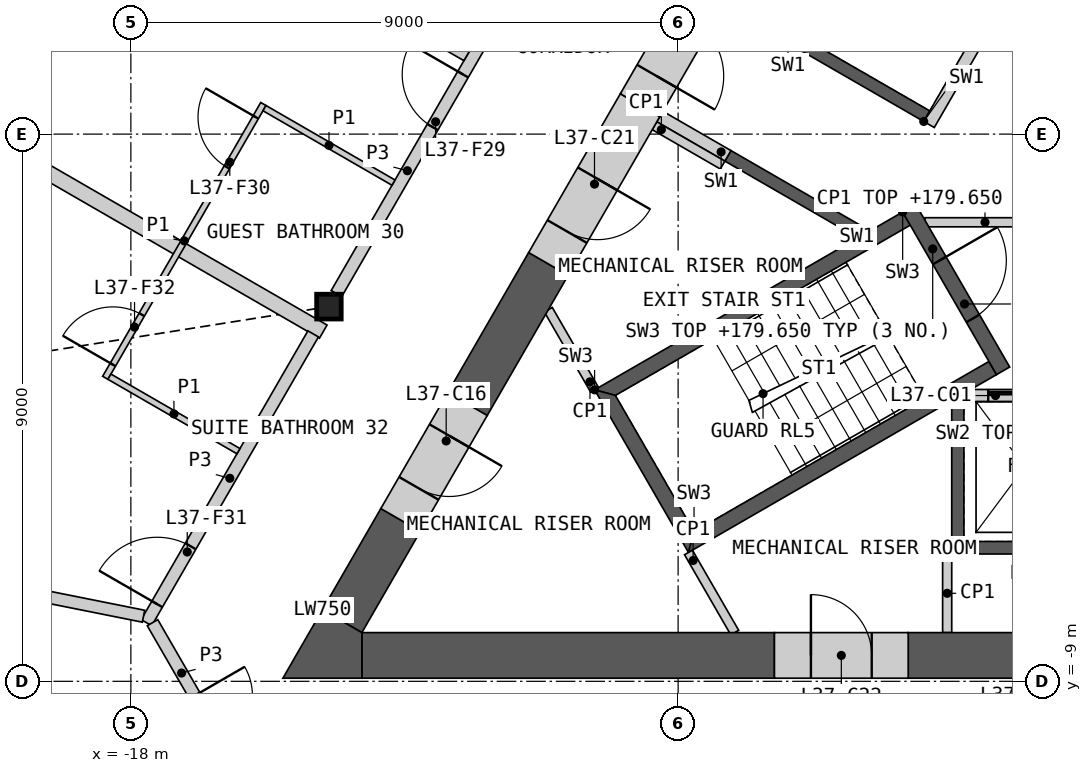
"""IFC4 building model, lengths in metres.
Left out: names, types, materials, properties, quantities, classifications, styles, units other than length and angle.
Written with IfcOpenShell. Run it as: python <this file> out.ifc"""

import sys

from ifc_helpers import new_model, si_unit, direction, frame, frame_2d, origin, origin_2d, place, context, subcontext, project, spatial, polyline, rectangle, i_section, outline, extrude, element, fill, save


model = new_model("IFC4")
c1 = context("Model", 3, precision=1e-05, world=origin(), true_north=direction((0.0, 1.0)))
c2 = subcontext(c1, "Body", "Model", "MODEL_VIEW")
j1 = project(units=[si_unit("LENGTHUNIT", "METRE"), si_unit("PLANEANGLEUNIT", "RADIAN")], contexts=[c1])
p1 = place(None, origin())
s1 = spatial("IfcSite", under=j1, at=p1, CompositionType="ELEMENT")
p2 = place(p1, origin())
s2 = spatial("IfcBuilding", under=s1, at=p2, CompositionType="ELEMENT")
p3 = place(p2, frame((0.0, 0.0, 176.4)))
s3 = spatial("IfcBuildingStorey", under=s2, at=p3, CompositionType="ELEMENT", Elevation=176.4)
p4 = place(p3, frame((-14.743, -2.837, 0.0), z_axis=(0.0, 0.0, 1.0), x_axis=(1.0, 0.0, 0.0)))
e1 = element("IfcColumn", 1, at=p4, inside=s3, PredefinedType="COLUMN", context=c2, shape_type="SweptSolid", body=[
    extrude(i_section(OverallWidth=0.404, OverallDepth=0.407, WebThickness=0.027, FlangeThickness=0.044, at=origin_2d()), origin(), (0.0, 0.0, 1.0), 3.6),
])
p5 = place(p3, origin())
e2 = element("IfcWall", 2, at=p5, inside=s3, PredefinedType="SHEAR", context=c2, shape_type="SweptSolid", body=[
    extrude(outline(polyline([(0.1, -4.4), (0.1, -6.906), (-4.5, -6.906), (-4.5, -4.4), (-4.3, -4.4), (-4.3, -6.7), (-2.3, -6.7), (-2.3, -4.4), (-2.1, -4.4), (-2.1, -6.7), (-0.1, -6.7), (-0.1, -4.4), (0.1, -4.4)])), origin(), (0.0, 0.0, 1.0), 3.25),
])
p6 = place(p3, frame((-4.187, -4.3, 0.0), z_axis=(0.0, 0.0, 1.0), x_axis=(1.0, 0.0, 0.0)))
e3 = element("IfcWall", 3, at=p6, inside=s3, PredefinedType="SOLIDWALL", context=c2, shape_type="SweptSolid", body=[
    extrude(rectangle(XDim=8.373, YDim=0.2, at=frame_2d((4.187, 0.0))), origin(), (0.0, 0.0, 1.0), 3.25),
])
p7 = place(p6, frame((0.287, 0.0, 0.0)))
e4 = element("IfcOpeningElement", 4, at=p7, cuts=e3, PredefinedType="OPENING", context=c2, shape_type="SweptSolid", body=[
    extrude(rectangle(XDim=1.2, YDim=2.1, at=frame_2d((0.6, 1.05))), frame((0.0, 0.11, 0.0), z_axis=(0.0, -1.0, 0.0), x_axis=(1.0, 0.0, 0.0)), (0.0, 0.0, 1.0), 0.22),
])
p8 = place(p6, frame((2.387, 0.0, 0.0)))
e5 = element("IfcOpeningElement", 5, at=p8, cuts=e3, PredefinedType="OPENING", context=c2, shape_type="SweptSolid", body=[
    extrude(rectangle(XDim=1.4, YDim=2.1, at=frame_2d((0.7, 1.05))), frame((0.0, 0.11, 0.0), z_axis=(0.0, -1.0, 0.0), x_axis=(1.0, 0.0, 0.0)), (0.0, 0.0, 1.0), 0.22),
])
p9 = place(p6, frame((4.837, 0.0, 0.0)))
e6 = element("IfcOpeningElement", 6, at=p9, cuts=e3, PredefinedType="OPENING", context=c2, shape_type="SweptSolid", body=[
    extrude(rectangle(XDim=0.9, YDim=2.1, at=frame_2d((0.45, 1.05))), frame((0.0, 0.11, 0.0), z_axis=(0.0, -1.0, 0.0), x_axis=(1.0, 0.0, 0.0)), (0.0, 0.0, 1.0), 0.22),
])
p10 = place(p6, frame((6.887, 0.0, 0.0)))
e7 = element("IfcOpeningElement", 7, at=p10, cuts=e3, PredefinedType="OPENING", context=c2, shape_type="SweptSolid", body=[
    extrude(rectangle(XDim=1.2, YDim=2.1, at=frame_2d((0.6, 1.05))), frame((0.0, 0.11, 0.0), z_axis=(0.0, -1.0, 0.0), x_axis=(1.0, 0.0, 0.0)), (0.0, 0.0, 1.0), 0.22),
])
p11 = place(p3, origin())
e8 = element("IfcWall", 8, at=p11, inside=s3, PredefinedType="SHEAR", context=c2, shape_type="SweptSolid", body=[
    extrude(outline(polyline([(-6.061, -1.697), (-8.231, -0.444), (-8.131, -0.271), (-5.96, -1.524), (-6.061, -1.697)])), origin(), (0.0, 0.0, 1.0), 3.25),
])
p12 = place(p3, origin())
e9 = element("IfcWall", 9, at=p12, inside=s3, PredefinedType="SHEAR", context=c2, shape_type="SweptSolid", body=[
    extrude(outline(polyline([(-4.96, 0.208), (-7.131, 1.461), (-3.731, 7.35), (-1.561, 6.097), (-1.66, 5.924), (-3.652, 7.074), (-4.652, 5.342), (-2.66, 4.192), (-2.76, 4.019), (-4.752, 5.169), (-5.752, 3.437), (-3.76, 2.287), (-3.861, 2.113), (-5.852, 3.263), (-6.852, 1.531), (-4.861, 0.381), (-4.96, 0.208)])), origin(), (0.0, 0.0, 1.0), 3.25),
])
p13 = place(p3, frame((-1.631, 5.776, 0.0), z_axis=(0.0, 0.0, 1.0), x_axis=(-0.499992876559, -0.866029516466, 0.0)))
e10 = element("IfcWall", 10, at=p13, inside=s3, PredefinedType="SOLIDWALL", context=c2, shape_type="SweptSolid", body=[
    extrude(rectangle(XDim=6.486, YDim=0.2, at=frame_2d((3.243, 0.0))), origin(), (0.0, 0.0, 1.0), 3.25),
])
p14 = place(p13, frame((0.337, 0.0, 0.0)))
e11 = element("IfcOpeningElement", 11, at=p14, cuts=e10, PredefinedType="OPENING", context=c2, shape_type="SweptSolid", body=[
    extrude(rectangle(XDim=1.1, YDim=2.1, at=frame_2d((0.55, 1.05))), frame((0.0, 0.11, 0.0), z_axis=(0.0, -1.0, 0.0), x_axis=(1.0, 0.0, 0.0)), (0.0, 0.0, 1.0), 0.22),
])
p15 = place(p13, frame((2.537, 0.0, 0.0)))
e12 = element("IfcOpeningElement", 12, at=p15, cuts=e10, PredefinedType="OPENING", context=c2, shape_type="SweptSolid", body=[
    extrude(rectangle(XDim=1.1, YDim=2.1, at=frame_2d((0.55, 1.05))), frame((0.0, 0.11, 0.0), z_axis=(0.0, -1.0, 0.0), x_axis=(1.0, 0.0, 0.0)), (0.0, 0.0, 1.0), 0.22),
])
p16 = place(p3, frame((-8.181, -0.357, 0.0), z_axis=(0.0, 0.0, 1.0), x_axis=(-0.866003189247, 0.500038474733, 0.0)))
e13 = element("IfcWall", 13, at=p16, inside=s3, PredefinedType="SHEAR", context=c2, shape_type="SweptSolid", body=[
    extrude(rectangle(XDim=1.293, YDim=0.2, at=frame_2d((0.646, 0.0))), origin(), (0.0, 0.0, 1.0), 3.25),
])
p17 = place(p3, frame((-4.941, -1.45, 0.0), z_axis=(0.0, 0.0, 1.0), x_axis=(1.0, 0.0, 0.0)))
e14 = element("IfcWall", 14, at=p17, inside=s3, PredefinedType="PARTITIONING", context=c2, shape_type="SweptSolid", body=[
    extrude(rectangle(XDim=9.882, YDim=0.15, at=frame_2d((4.941, 0.0))), origin(), (0.0, 0.0, 1.0), 3.25),
])
p18 = place(p17, frame((4.391, 0.0, 0.0)))
e15 = element("IfcOpeningElement", 15, at=p18, cuts=e14, PredefinedType="OPENING", context=c2, shape_type="SweptSolid", body=[
    extrude(rectangle(XDim=1.1, YDim=2.1, at=frame_2d((0.55, 1.05))), frame((0.0, 0.085, 0.0), z_axis=(0.0, -1.0, 0.0), x_axis=(1.0, 0.0, 0.0)), (0.0, 0.0, 1.0), 0.17),
])
p19 = place(p3, origin())
e16 = element("IfcWall", 16, at=p19, inside=s3, PredefinedType="SHEAR", context=c2, shape_type="SweptSolid", body=[
    extrude(outline(polyline([(-5.307, -1.281), (-10.374, -4.206), (-10.032, -4.298), (-5.182, -1.498), (-5.307, -1.281)])), origin(), (0.0, 0.0, 1.0), 3.25),
])
p20 = place(p3, origin())
e17 = element("IfcWall", 17, at=p20, inside=s3, PredefinedType="SHEAR", context=c2, shape_type="SweptSolid", body=[
    extrude(outline(polyline([(-10.374, -4.206), (-8.83, -6.881), (-8.738, -6.539), (-10.032, -4.298), (-10.374, -4.206)])), origin(), (0.0, 0.0, 1.0), 3.25),
])
p21 = place(p3, origin())
e18 = element("IfcWall", 18, at=p21, inside=s3, PredefinedType="SHEAR", context=c2, shape_type="SweptSolid", body=[
    extrude(outline(polyline([(-8.738, -6.539), (-8.83, -6.881), (-3.763, -3.956), (-3.888, -3.739), (-8.738, -6.539)])), origin(), (0.0, 0.0, 1.0), 3.25),
])
p22 = place(p3, frame((-5.199, -1.219, 0.0), z_axis=(0.0, 0.0, 1.0), x_axis=(0.499982516597, -0.866035497597, 0.0)))
e19 = element("IfcWall", 19, at=p22, inside=s3, PredefinedType="SHEAR", context=c2, shape_type="SweptSolid", body=[
    extrude(rectangle(XDim=3.088, YDim=0.25, at=frame_2d((1.544, 0.0))), origin(), (0.0, 0.0, 1.0), 3.25),
])
p23 = place(p22, frame((0.994, 0.0, 0.0)))
e20 = element("IfcOpeningElement", 20, at=p23, cuts=e19, PredefinedType="OPENING", context=c2, shape_type="SweptSolid", body=[
    extrude(rectangle(XDim=1.1, YDim=2.1, at=frame_2d((0.55, 1.05))), frame((0.0, 0.135, 0.0), z_axis=(0.0, -1.0, 0.0), x_axis=(1.0, 0.0, 0.0)), (0.0, 0.0, 1.0), 0.27),
])
for number, where, z_axis, x_axis in (
    (21, (-4.575, -6.906, 0.0), (0.0, 0.0, 1.0), (0.0, -1.0, 0.0)),
    (22, (-8.268, -0.509, 0.0), (0.0, 0.0, 1.0), (-0.866, 0.5, 0.0)),
):
    element("IfcWall", number, at=place(p3, frame(where, z_axis=z_axis, x_axis=x_axis)), inside=s3, PredefinedType="PARTITIONING", context=c2, shape_type="SweptSolid", body=[
        extrude(rectangle(XDim=1.293, YDim=0.15, at=frame_2d((0.646, 0.0))), origin(), (0.0, 0.0, 1.0), 3.25),
    ])
for number, where, z_axis, x_axis in (
    (23, (-8.83, -6.881, 0.0), (0.0, 0.0, 1.0), (0.5, -0.866, 0.0)),
    (24, (-10.374, -4.206, 0.0), (0.0, 0.0, 1.0), (-0.5, 0.866, 0.0)),
):
    element("IfcWall", number, at=place(p3, frame(where, z_axis=z_axis, x_axis=x_axis)), inside=s3, PredefinedType="PARTITIONING", context=c2, shape_type="SweptSolid", body=[
        extrude(rectangle(XDim=1.522, YDim=0.15, at=frame_2d((0.761, 0.0))), origin(), (0.0, 0.0, 1.0), 3.25),
    ])
p24 = place(p3, frame((-14.201, -8.574, 0.0), z_axis=(0.0, 0.0, 1.0), x_axis=(1.0, 0.0, 0.0)))
e25 = element("IfcWall", 25, at=p24, inside=s3, PredefinedType="SHEAR", context=c2, shape_type="SweptSolid", body=[
    extrude(rectangle(XDim=6.785, YDim=0.75, at=frame_2d((3.393, 0.0))), origin(), (0.0, 0.0, 1.0), 3.25),
])
p25 = place(p3, frame((-5.216, -8.574, 0.0), z_axis=(0.0, 0.0, 1.0), x_axis=(1.0, 0.0, 0.0)))
e26 = element("IfcWall", 26, at=p25, inside=s3, PredefinedType="SHEAR", context=c2, shape_type="SweptSolid", body=[
    extrude(rectangle(XDim=1.816, YDim=0.75, at=frame_2d((0.908, 0.0))), origin(), (0.0, 0.0, 1.0), 3.25),
])
p26 = place(p3, frame((-11.133, -2.135, 0.0), z_axis=(0.0, 0.0, 1.0), x_axis=(-0.499936812382, -0.866061882099, 0.0)))
e27 = element("IfcWall", 27, at=p26, inside=s3, PredefinedType="SHEAR", context=c2, shape_type="SweptSolid", body=[
    extrude(rectangle(XDim=2.662, YDim=0.75, at=frame_2d((1.331, 0.0))), origin(), (0.0, 0.0, 1.0), 3.25),
])
p27 = place(p3, frame((-13.564, -6.346, 0.0), z_axis=(0.0, 0.0, 1.0), x_axis=(-0.499989888488, -0.86603124159, 0.0)))
e28 = element("IfcWall", 28, at=p27, inside=s3, PredefinedType="SHEAR", context=c2, shape_type="SweptSolid", body=[
    extrude(rectangle(XDim=1.923, YDim=0.75, at=frame_2d((0.961, 0.0))), origin(), (0.0, 0.0, 1.0), 3.25),
])
p28 = place(p3, origin())
e29 = element("IfcWall", 29, at=p28, inside=s3, PredefinedType="SHEAR", context=c2, shape_type="SweptSolid", body=[
    extrude(outline(polyline([(-14.851, -7.824), (-14.201, -8.199), (-14.201, -8.949), (-15.5, -8.949), (-14.851, -7.824)])), origin(), (0.0, 0.0, 1.0), 3.25),
])
p29 = place(p3, frame((-12.464, -4.441, 0.0), z_axis=(0.0, 0.0, 1.0), x_axis=(-0.499994660107, -0.866028486751, 0.0)))
e30 = element("IfcWall", 30, at=p29, inside=s3, PredefinedType="SHEAR", context=c2, shape_type="SweptSolid", body=[
    extrude(rectangle(XDim=2.2, YDim=0.75, at=frame_2d((1.1, 0.0))), origin(), (0.0, 0.0, 1.0), 3.25),
])
p30 = place(p29, frame((0.6, 0.0, 0.0)))
e31 = element("IfcOpeningElement", 31, at=p30, cuts=e30, PredefinedType="OPENING", context=c2, shape_type="SweptSolid", body=[
    extrude(rectangle(XDim=1.0, YDim=2.1, at=frame_2d((0.5, 1.05))), frame((0.0, 0.385, 0.0), z_axis=(0.0, -1.0, 0.0), x_axis=(1.0, 0.0, 0.0)), (0.0, 0.0, 1.0), 0.77),
])
p31 = place(p3, frame((-9.625, 0.477, 0.0), z_axis=(0.0, 0.0, 1.0), x_axis=(-0.499995718215, -0.86602787586, 0.0)))
e32 = element("IfcWall", 32, at=p31, inside=s3, PredefinedType="SHEAR", context=c2, shape_type="SweptSolid", body=[
    extrude(rectangle(XDim=3.016, YDim=0.75, at=frame_2d((1.508, 0.0))), origin(), (0.0, 0.0, 1.0), 3.25),
])
p32 = place(p31, frame((1.4, 0.0, 0.0)))
e33 = element("IfcOpeningElement", 33, at=p32, cuts=e32, PredefinedType="OPENING", context=c2, shape_type="SweptSolid", body=[
    extrude(rectangle(XDim=1.0, YDim=2.1, at=frame_2d((0.5, 1.05))), frame((0.0, 0.385, 0.0), z_axis=(0.0, -1.0, 0.0), x_axis=(1.0, 0.0, 0.0)), (0.0, 0.0, 1.0), 0.77),
])
p33 = place(p3, frame((-7.416, -8.574, 0.0), z_axis=(0.0, 0.0, 1.0), x_axis=(1.0, 0.0, 0.0)))
e34 = element("IfcWall", 34, at=p33, inside=s3, PredefinedType="SHEAR", context=c2, shape_type="SweptSolid", body=[
    extrude(rectangle(XDim=2.2, YDim=0.75, at=frame_2d((1.1, 0.0))), origin(), (0.0, 0.0, 1.0), 3.25),
])
p34 = place(p33, frame((0.6, 0.0, 0.0)))
e35 = element("IfcOpeningElement", 35, at=p34, cuts=e34, PredefinedType="OPENING", context=c2, shape_type="SweptSolid", body=[
    extrude(rectangle(XDim=1.0, YDim=2.1, at=frame_2d((0.5, 1.05))), frame((0.0, 0.385, 0.0), z_axis=(0.0, -1.0, 0.0), x_axis=(1.0, 0.0, 0.0)), (0.0, 0.0, 1.0), 0.77),
])
p35 = place(p3, frame((-8.525, 2.382, 0.0), z_axis=(0.0, 0.0, 1.0), x_axis=(-0.500077893725, -0.86598042715, 0.0)))
e36 = element("IfcWall", 36, at=p35, inside=s3, PredefinedType="SHEAR", context=c2, shape_type="SweptSolid", body=[
    extrude(rectangle(XDim=2.2, YDim=0.75, at=frame_2d((1.1, 0.0))), origin(), (0.0, 0.0, 1.0), 3.25),
])
p36 = place(p35, frame((0.55, 0.0, 0.0)))
e37 = element("IfcOpeningElement", 37, at=p36, cuts=e36, PredefinedType="OPENING", context=c2, shape_type="SweptSolid", body=[
    extrude(rectangle(XDim=1.1, YDim=2.1, at=frame_2d((0.55, 1.05))), frame((0.0, 0.385, 0.0), z_axis=(0.0, -1.0, 0.0), x_axis=(1.0, 0.0, 0.0)), (0.0, 0.0, 1.0), 0.77),
])
p37 = place(p3, frame((-26.164, 3.292, 0.0), z_axis=(0.0, 0.0, 1.0), x_axis=(0.866022412254, -0.500005181446, 0.0)))
e38 = element("IfcWall", 38, at=p37, inside=s3, PredefinedType="PARTITIONING", context=c2, shape_type="SweptSolid", body=[
    extrude(rectangle(XDim=13.081, YDim=0.25, at=frame_2d((6.541, 0.0))), origin(), (0.0, 0.0, 1.0), 2.404),
])
p38 = place(p3, frame((-14.619, -2.624, 0.0), z_axis=(0.0, 0.0, 1.0), x_axis=(0.50000393355, 0.866023132736, 0.0)))
e39 = element("IfcWall", 39, at=p38, inside=s3, PredefinedType="PARTITIONING", context=c2, shape_type="SweptSolid", body=[
    extrude(rectangle(XDim=9.335, YDim=0.2, at=frame_2d((4.667, 0.0))), origin(), (0.0, 0.0, 1.0), 3.25),
])
p39 = place(p38, frame((3.163, 0.0, 0.0)))
e40 = element("IfcOpeningElement", 40, at=p39, cuts=e39, PredefinedType="OPENING", context=c2, shape_type="SweptSolid", body=[
    extrude(rectangle(XDim=1.0, YDim=2.1, at=frame_2d((0.5, 1.05))), frame((0.0, 0.11, 0.0), z_axis=(0.0, -1.0, 0.0), x_axis=(1.0, 0.0, 0.0)), (0.0, 0.0, 1.0), 0.22),
])
p40 = place(p3, frame((-17.744, -8.035, 0.0), z_axis=(0.0, 0.0, 1.0), x_axis=(0.500007607708, 0.866021011428, 0.0)))
e41 = element("IfcWall", 41, at=p40, inside=s3, PredefinedType="PARTITIONING", context=c2, shape_type="SweptSolid", body=[
    extrude(rectangle(XDim=5.484, YDim=0.2, at=frame_2d((2.742, 0.0))), origin(), (0.0, 0.0, 1.0), 3.25),
])
p41 = place(p40, frame((0.352, 0.0, 0.0)))
e42 = element("IfcOpeningElement", 42, at=p41, cuts=e41, PredefinedType="OPENING", context=c2, shape_type="SweptSolid", body=[
    extrude(rectangle(XDim=1.1, YDim=2.1, at=frame_2d((0.55, 1.05))), frame((0.0, 0.11, 0.0), z_axis=(0.0, -1.0, 0.0), x_axis=(1.0, 0.0, 0.0)), (0.0, 0.0, 1.0), 0.22),
])
p42 = place(p3, frame((-17.644, -8.035, 0.0), z_axis=(0.0, 0.0, 1.0), x_axis=(0.499961815444, -0.866047448526, 0.0)))
e43 = element("IfcWall", 43, at=p42, inside=s3, PredefinedType="PARTITIONING", context=c2, shape_type="SweptSolid", body=[
    extrude(rectangle(XDim=3.826, YDim=0.2, at=frame_2d((1.913, 0.0))), origin(), (0.0, 0.0, 1.0), 3.25),
])
p43 = place(p42, frame((1.386, 0.0, 0.0)))
e44 = element("IfcOpeningElement", 44, at=p43, cuts=e43, PredefinedType="OPENING", context=c2, shape_type="SweptSolid", body=[
    extrude(rectangle(XDim=0.95, YDim=2.1, at=frame_2d((0.475, 1.05))), frame((0.0, 0.11, 0.0), z_axis=(0.0, -1.0, 0.0), x_axis=(1.0, 0.0, 0.0)), (0.0, 0.0, 1.0), 0.22),
])
p44 = place(p3, frame((-31.329, -5.221, 0.0), z_axis=(0.0, 0.0, 1.0), x_axis=(0.980565709097, -0.196190953266, 0.0)))
e45 = element("IfcWall", 45, at=p44, inside=s3, PredefinedType="PARTITIONING", context=c2, shape_type="SweptSolid", body=[
    extrude(rectangle(XDim=13.805, YDim=0.2, at=frame_2d((6.903, 0.0))), origin(), (0.0, 0.0, 1.0), 2.404),
])
p45 = place(p3, frame((-22.363, -7.862, 0.0), z_axis=(0.0, 0.0, 1.0), x_axis=(0.500009728207, -0.866019787128, 0.0)))
e46 = element("IfcWall", 46, at=p45, inside=s3, PredefinedType="PARTITIONING", context=c2, shape_type="SweptSolid", body=[
    extrude(rectangle(XDim=11.967, YDim=0.2, at=frame_2d((5.983, 0.0))), origin(), (0.0, 0.0, 1.0), 2.404),
])
p46 = place(p45, frame((5.658, 0.0, 0.0)))
e47 = element("IfcOpeningElement", 47, at=p46, cuts=e46, PredefinedType="OPENING", context=c2, shape_type="SweptSolid", body=[
    extrude(rectangle(XDim=0.95, YDim=2.1, at=frame_2d((0.475, 1.05))), frame((0.0, 0.11, 0.0), z_axis=(0.0, -1.0, 0.0), x_axis=(1.0, 0.0, 0.0)), (0.0, 0.0, 1.0), 0.22),
])
p47 = place(p3, frame((-19.555, 5.383, 0.0), z_axis=(0.0, 0.0, 1.0), x_axis=(0.866027979776, -0.499995538225, 0.0)))
e48 = element("IfcWall", 48, at=p47, inside=s3, PredefinedType="PARTITIONING", context=c2, shape_type="SweptSolid", body=[
    extrude(rectangle(XDim=8.177, YDim=0.2, at=frame_2d((4.089, 0.0))), origin(), (0.0, 0.0, 1.0), 2.404),
])
p48 = place(p3, frame((-18.421, -4.008, 0.0), z_axis=(0.0, 0.0, 1.0), x_axis=(0.500006934395, 0.866021400173, 0.0)))
e49 = element("IfcWall", 49, at=p48, inside=s3, PredefinedType="PARTITIONING", context=c2, shape_type="SweptSolid", body=[
    extrude(rectangle(XDim=5.2, YDim=0.1, at=frame_2d((2.6, 0.0))), origin(), (0.0, 0.0, 1.0), 2.404),
])
p49 = place(p48, frame((4.0, 0.0, 0.0)))
e50 = element("IfcOpeningElement", 50, at=p49, cuts=e49, PredefinedType="OPENING", context=c2, shape_type="SweptSolid", body=[
    extrude(rectangle(XDim=0.95, YDim=2.1, at=frame_2d((0.475, 1.05))), frame((0.0, 0.06, 0.0), z_axis=(0.0, -1.0, 0.0), x_axis=(1.0, 0.0, 0.0)), (0.0, 0.0, 1.0), 0.12),
])
p50 = place(p48, frame((0.25, 0.0, 0.0)))
e51 = element("IfcOpeningElement", 51, at=p50, cuts=e49, PredefinedType="OPENING", context=c2, shape_type="SweptSolid", body=[
    extrude(rectangle(XDim=0.95, YDim=2.1, at=frame_2d((0.475, 1.05))), frame((0.0, 0.06, 0.0), z_axis=(0.0, -1.0, 0.0), x_axis=(1.0, 0.0, 0.0)), (0.0, 0.0, 1.0), 0.12),
])
p51 = place(p3, frame((-18.353, -3.99, 0.0), z_axis=(0.0, 0.0, 1.0), x_axis=(0.866057815567, -0.499943856944, 0.0)))
e52 = element("IfcWall", 52, at=p51, inside=s3, PredefinedType="PARTITIONING", context=c2, shape_type="SweptSolid", body=[
    extrude(rectangle(XDim=2.45, YDim=0.1, at=frame_2d((1.225, 0.0))), origin(), (0.0, 0.0, 1.0), 2.404),
])
p52 = place(p3, frame((-15.802, 0.427, 0.0), z_axis=(0.0, 0.0, 1.0), x_axis=(0.866032905446, -0.499987006516, 0.0)))
e53 = element("IfcWall", 53, at=p52, inside=s3, PredefinedType="PARTITIONING", context=c2, shape_type="SweptSolid", body=[
    extrude(rectangle(XDim=2.45, YDim=0.1, at=frame_2d((1.225, 0.0))), origin(), (0.0, 0.0, 1.0), 2.404),
])
p53 = place(p7, origin())
e54 = element("IfcDoor", 54, at=p53, inside=s3, OperationType="SLIDING_TO_LEFT", PredefinedType="DOOR", context=c2, shape_type="SweptSolid", body=[
    extrude(rectangle(XDim=1.2, YDim=2.1, at=frame_2d((0.6, 1.05))), frame((0.0, 0.025, 0.0), z_axis=(0.0, -1.0, 0.0), x_axis=(1.0, 0.0, 0.0)), (0.0, 0.0, 1.0), 0.05),
])
fill(e4, e54)
p54 = place(p23, origin())
e55 = element("IfcDoor", 55, at=p54, inside=s3, OperationType="SINGLE_SWING_LEFT", PredefinedType="DOOR", context=c2, shape_type="SweptSolid", body=[
    extrude(rectangle(XDim=1.1, YDim=2.1, at=frame_2d((0.55, 1.05))), frame((0.0, 0.025, 0.0), z_axis=(0.0, -1.0, 0.0), x_axis=(1.0, 0.0, 0.0)), (0.0, 0.0, 1.0), 0.05),
])
fill(e20, e55)
p55 = place(p30, origin())
e56 = element("IfcDoor", 56, at=p55, inside=s3, OperationType="SINGLE_SWING_LEFT", PredefinedType="DOOR", context=c2, shape_type="SweptSolid", body=[
    extrude(rectangle(XDim=1.0, YDim=2.1, at=frame_2d((0.5, 1.05))), frame((0.0, 0.13, 0.0), z_axis=(0.0, -1.0, 0.0), x_axis=(1.0, 0.0, 0.0)), (0.0, 0.0, 1.0), 0.05),
])
fill(e31, e56)
p56 = place(p32, origin())
e57 = element("IfcDoor", 57, at=p56, inside=s3, OperationType="SINGLE_SWING_LEFT", PredefinedType="DOOR", context=c2, shape_type="SweptSolid", body=[
    extrude(rectangle(XDim=1.0, YDim=2.1, at=frame_2d((0.5, 1.05))), frame((0.0, 0.13, 0.0), z_axis=(0.0, -1.0, 0.0), x_axis=(1.0, 0.0, 0.0)), (0.0, 0.0, 1.0), 0.05),
])
fill(e33, e57)
p57 = place(p34, origin())
e58 = element("IfcDoor", 58, at=p57, inside=s3, OperationType="SINGLE_SWING_LEFT", PredefinedType="DOOR", context=c2, shape_type="SweptSolid", body=[
    extrude(rectangle(XDim=1.0, YDim=2.1, at=frame_2d((0.5, 1.05))), frame((0.0, 0.13, 0.0), z_axis=(0.0, -1.0, 0.0), x_axis=(1.0, 0.0, 0.0)), (0.0, 0.0, 1.0), 0.05),
])
fill(e35, e58)
p58 = place(p36, origin())
e59 = element("IfcDoor", 59, at=p58, inside=s3, OperationType="SINGLE_SWING_RIGHT", PredefinedType="DOOR", context=c2, shape_type="SweptSolid", body=[
    extrude(rectangle(XDim=1.1, YDim=2.1, at=frame_2d((0.55, 1.05))), frame((0.0, 0.13, 0.0), z_axis=(0.0, -1.0, 0.0), x_axis=(1.0, 0.0, 0.0)), (0.0, 0.0, 1.0), 0.05),
])
fill(e37, e59)
p59 = place(p39, origin())
e60 = element("IfcDoor", 60, at=p59, inside=s3, OperationType="SINGLE_SWING_RIGHT", PredefinedType="DOOR", context=c2, shape_type="SweptSolid", body=[
    extrude(rectangle(XDim=1.0, YDim=2.1, at=frame_2d((0.5, 1.05))), frame((0.0, 0.025, 0.0), z_axis=(0.0, -1.0, 0.0), x_axis=(1.0, 0.0, 0.0)), (0.0, 0.0, 1.0), 0.05),
])
fill(e40, e60)
p60 = place(p49, origin())
e61 = element("IfcDoor", 61, at=p60, inside=s3, OperationType="SINGLE_SWING_RIGHT", PredefinedType="DOOR", context=c2, shape_type="SweptSolid", body=[
    extrude(rectangle(XDim=0.95, YDim=2.1, at=frame_2d((0.475, 1.05))), frame((0.0, 0.025, 0.0), z_axis=(0.0, -1.0, 0.0), x_axis=(1.0, 0.0, 0.0)), (0.0, 0.0, 1.0), 0.05),
])
fill(e50, e61)
p61 = place(p41, origin())
e62 = element("IfcDoor", 62, at=p61, inside=s3, OperationType="SINGLE_SWING_LEFT", PredefinedType="DOOR", context=c2, shape_type="SweptSolid", body=[
    extrude(rectangle(XDim=1.1, YDim=2.1, at=frame_2d((0.55, 1.05))), frame((0.0, 0.025, 0.0), z_axis=(0.0, -1.0, 0.0), x_axis=(1.0, 0.0, 0.0)), (0.0, 0.0, 1.0), 0.05),
])
fill(e42, e62)
p62 = place(p50, origin())
e63 = element("IfcDoor", 63, at=p62, inside=s3, OperationType="SINGLE_SWING_LEFT", PredefinedType="DOOR", context=c2, shape_type="SweptSolid", body=[
    extrude(rectangle(XDim=0.95, YDim=2.1, at=frame_2d((0.475, 1.05))), frame((0.0, 0.025, 0.0), z_axis=(0.0, -1.0, 0.0), x_axis=(1.0, 0.0, 0.0)), (0.0, 0.0, 1.0), 0.05),
])
fill(e51, e63)
save(model, sys.argv[1])
